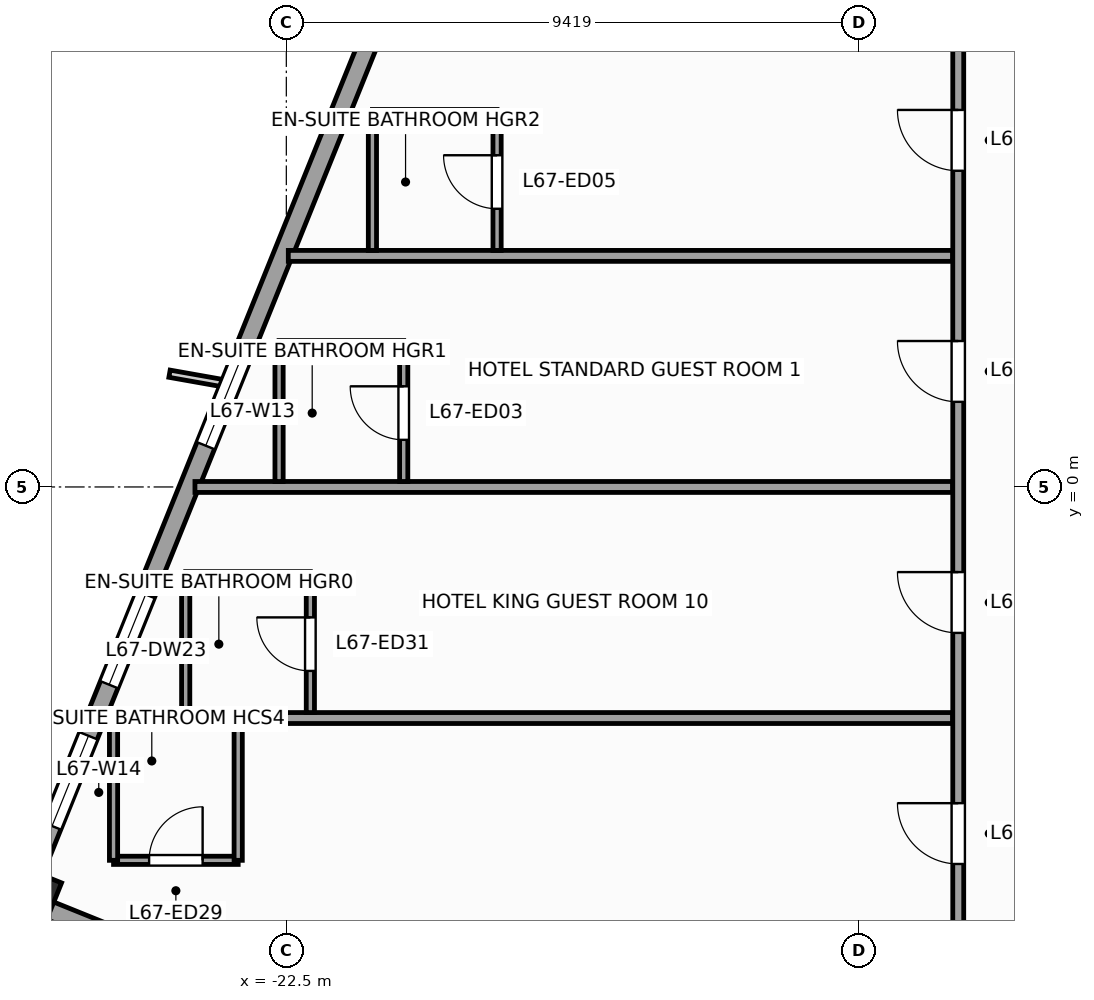
"""IFC4 building model, lengths in metres.
Left out: names, types, materials, properties, quantities, classifications, styles, units other than length and angle.
Written with IfcOpenShell. Run it as: python <this file> out.ifc"""

import sys

from ifc_helpers import new_model, si_unit, direction, frame, frame_2d, origin, origin_2d, place, context, subcontext, project, spatial, rectangle, extrude, source, transform, mapped, element, fill, save


model = new_model("IFC4")
c1 = context("Model", 3, precision=1e-05, world=origin(), true_north=direction((0.0, 1.0)))
c2 = subcontext(c1, "Body", "Model", "MODEL_VIEW")
j1 = project(units=[si_unit("LENGTHUNIT", "METRE"), si_unit("PLANEANGLEUNIT", "RADIAN")], contexts=[c1])
p1 = place(None, origin())
s1 = spatial("IfcSite", under=j1, at=p1, CompositionType="ELEMENT")
p2 = place(p1, origin())
s2 = spatial("IfcBuilding", under=s1, at=p2, CompositionType="ELEMENT")
p3 = place(p2, frame((0.0, 0.0, 276.0)))
s3 = spatial("IfcBuildingStorey", under=s2, at=p3, CompositionType="ELEMENT", Elevation=276.0)
m1 = source(origin(), c2, "Body", "SweptSolid", [
    extrude(rectangle(XDim=0.65, YDim=0.65, at=origin_2d()), origin(), (0.0, 0.0, 1.0), 3.6),
])
p4 = place(p3, frame((-26.62, -6.69, 0.0), z_axis=(0.0, 0.0, 1.0), x_axis=(0.374606593416, 0.927183854567, 0.0)))
e1 = element("IfcColumn", 1, at=p4, inside=s3, PredefinedType="COLUMN", context=c2, shape_type="MappedRepresentation", body=[
    mapped(m1, transform((0.0, 0.0, 0.0), scale=1.0)),
])
p5 = place(p3, frame((-14.479, 23.813, 0.0), z_axis=(0.0, 0.0, 1.0), x_axis=(-0.374609557019, -0.927182657188, 0.0)))
e2 = element("IfcWall", 2, at=p5, inside=s3, PredefinedType="STANDARD", context=c2, shape_type="SweptSolid", body=[
    extrude(rectangle(XDim=33.31, YDim=0.31, at=frame_2d((16.655, 0.0))), origin(), (0.0, 0.0, 1.0), 2.75),
])
p6 = place(p5, frame((3.197, 0.0, 0.47)))
e3 = element("IfcOpeningElement", 3, at=p6, cuts=e2, PredefinedType="OPENING", context=c2, shape_type="SweptSolid", body=[
    extrude(rectangle(XDim=1.6, YDim=2.1, at=frame_2d((0.8, 1.05))), frame((0.0, 0.165, 0.0), z_axis=(0.0, -1.0, 0.0), x_axis=(1.0, 0.0, 0.0)), (0.0, 0.0, 1.0), 0.33),
])
p7 = place(p5, frame((8.86, 0.0, 0.47)))
e4 = element("IfcOpeningElement", 4, at=p7, cuts=e2, PredefinedType="OPENING", context=c2, shape_type="SweptSolid", body=[
    extrude(rectangle(XDim=1.6, YDim=2.1, at=frame_2d((0.8, 1.05))), frame((0.0, 0.165, 0.0), z_axis=(0.0, -1.0, 0.0), x_axis=(1.0, 0.0, 0.0)), (0.0, 0.0, 1.0), 0.33),
])
p8 = place(p5, frame((14.439, 0.0, 0.47)))
e5 = element("IfcOpeningElement", 5, at=p8, cuts=e2, PredefinedType="OPENING", context=c2, shape_type="SweptSolid", body=[
    extrude(rectangle(XDim=1.6, YDim=2.1, at=frame_2d((0.8, 1.05))), frame((0.0, 0.165, 0.0), z_axis=(0.0, -1.0, 0.0), x_axis=(1.0, 0.0, 0.0)), (0.0, 0.0, 1.0), 0.33),
])
p9 = place(p5, frame((23.351, 0.0, 0.47)))
e6 = element("IfcOpeningElement", 6, at=p9, cuts=e2, PredefinedType="OPENING", context=c2, shape_type="SweptSolid", body=[
    extrude(rectangle(XDim=1.6, YDim=2.1, at=frame_2d((0.8, 1.05))), frame((0.0, 0.165, 0.0), z_axis=(0.0, -1.0, 0.0), x_axis=(1.0, 0.0, 0.0)), (0.0, 0.0, 1.0), 0.33),
])
p10 = place(p5, frame((30.097, 0.0, 0.47)))
e7 = element("IfcOpeningElement", 7, at=p10, cuts=e2, PredefinedType="OPENING", context=c2, shape_type="SweptSolid", body=[
    extrude(rectangle(XDim=1.6, YDim=2.1, at=frame_2d((0.8, 1.05))), frame((0.0, 0.165, 0.0), z_axis=(0.0, -1.0, 0.0), x_axis=(1.0, 0.0, 0.0)), (0.0, 0.0, 1.0), 0.33),
])
p11 = place(p5, frame((27.59, 0.0, 0.47)))
e8 = element("IfcOpeningElement", 8, at=p11, cuts=e2, PredefinedType="OPENING", context=c2, shape_type="SweptSolid", body=[
    extrude(rectangle(XDim=1.6, YDim=2.1, at=frame_2d((0.8, 1.05))), frame((0.0, 0.165, 0.0), z_axis=(0.0, -1.0, 0.0), x_axis=(1.0, 0.0, 0.0)), (0.0, 0.0, 1.0), 0.33),
])
p12 = place(p3, frame((-26.841, -6.784, 0.0), z_axis=(0.0, 0.0, 1.0), x_axis=(0.927171722085, -0.374636620962, 0.0)))
e9 = element("IfcWall", 9, at=p12, inside=s3, PredefinedType="STANDARD", context=c2, shape_type="SweptSolid", body=[
    extrude(rectangle(XDim=6.0, YDim=0.31, at=frame_2d((3.0, 0.0))), origin(), (0.0, 0.0, 1.0), 2.65),
])
p13 = place(p3, frame((-11.45, -12.35, 0.0), z_axis=(0.0, 0.0, 1.0), x_axis=(0.0, 1.0, 0.0)))
e10 = element("IfcWall", 10, at=p13, inside=s3, PredefinedType="PARTITIONING", context=c2, shape_type="SweptSolid", body=[
    extrude(rectangle(XDim=23.7, YDim=0.18, at=frame_2d((11.85, 0.0))), origin(), (0.0, 0.0, 1.0), 3.35),
])
p14 = place(p13, frame((13.75, 0.0, 0.0)))
e11 = element("IfcOpeningElement", 11, at=p14, cuts=e10, PredefinedType="OPENING", context=c2, shape_type="SweptSolid", body=[
    extrude(rectangle(XDim=1.0, YDim=2.15, at=frame_2d((0.5, 1.075))), frame((0.0, 0.1, 0.0), z_axis=(0.0, -1.0, 0.0), x_axis=(1.0, 0.0, 0.0)), (0.0, 0.0, 1.0), 0.2),
])
p15 = place(p13, frame((17.55, 0.0, 0.0)))
e12 = element("IfcOpeningElement", 12, at=p15, cuts=e10, PredefinedType="OPENING", context=c2, shape_type="SweptSolid", body=[
    extrude(rectangle(XDim=1.0, YDim=2.15, at=frame_2d((0.5, 1.075))), frame((0.0, 0.1, 0.0), z_axis=(0.0, -1.0, 0.0), x_axis=(1.0, 0.0, 0.0)), (0.0, 0.0, 1.0), 0.2),
])
p16 = place(p13, frame((6.15, 0.0, 0.0)))
e13 = element("IfcOpeningElement", 13, at=p16, cuts=e10, PredefinedType="OPENING", context=c2, shape_type="SweptSolid", body=[
    extrude(rectangle(XDim=1.0, YDim=2.15, at=frame_2d((0.5, 1.075))), frame((0.0, 0.1, 0.0), z_axis=(0.0, -1.0, 0.0), x_axis=(1.0, 0.0, 0.0)), (0.0, 0.0, 1.0), 0.2),
])
p17 = place(p13, frame((9.95, 0.0, 0.0)))
e14 = element("IfcOpeningElement", 14, at=p17, cuts=e10, PredefinedType="OPENING", context=c2, shape_type="SweptSolid", body=[
    extrude(rectangle(XDim=1.0, YDim=2.15, at=frame_2d((0.5, 1.075))), frame((0.0, 0.1, 0.0), z_axis=(0.0, -1.0, 0.0), x_axis=(1.0, 0.0, 0.0)), (0.0, 0.0, 1.0), 0.2),
])
p18 = place(p3, frame((-11.545, -3.8, 0.0), z_axis=(0.0, 0.0, 1.0), x_axis=(-1.0, 0.0, 0.0)))
e15 = element("IfcWall", 15, at=p18, inside=s3, PredefinedType="PARTITIONING", context=c2, shape_type="SweptSolid", body=[
    extrude(rectangle(XDim=13.993, YDim=0.18, at=frame_2d((6.997, 0.0))), origin(), (0.0, 0.0, 1.0), 3.35),
])
p19 = place(p3, frame((-11.545, 0.0, 0.0), z_axis=(0.0, 0.0, 1.0), x_axis=(-1.0, 0.0, 0.0)))
e16 = element("IfcWall", 16, at=p19, inside=s3, PredefinedType="PARTITIONING", context=c2, shape_type="SweptSolid", body=[
    extrude(rectangle(XDim=12.458, YDim=0.18, at=frame_2d((6.229, 0.0))), origin(), (0.0, 0.0, 1.0), 3.02),
])
p20 = place(p3, frame((-11.545, 3.8, 0.0), z_axis=(0.0, 0.0, 1.0), x_axis=(-1.0, 0.0, 0.0)))
e17 = element("IfcWall", 17, at=p20, inside=s3, PredefinedType="PARTITIONING", context=c2, shape_type="SweptSolid", body=[
    extrude(rectangle(XDim=10.923, YDim=0.18, at=frame_2d((5.461, 0.0))), origin(), (0.0, 0.0, 1.0), 3.02),
])
p21 = place(p3, frame((-20.57, 0.09, 0.0), z_axis=(0.0, 0.0, 1.0), x_axis=(0.0, 1.0, 0.0)))
e18 = element("IfcWall", 18, at=p21, inside=s3, PredefinedType="PARTITIONING", context=c2, shape_type="SweptSolid", body=[
    extrude(rectangle(XDim=2.25, YDim=0.135, at=frame_2d((1.125, 0.0))), origin(), (0.0, 0.0, 1.0), 3.35),
])
p22 = place(p21, frame((0.685, 0.0, 0.0)))
e19 = element("IfcOpeningElement", 19, at=p22, cuts=e18, PredefinedType="OPENING", context=c2, shape_type="SweptSolid", body=[
    extrude(rectangle(XDim=0.88, YDim=2.1, at=frame_2d((0.44, 1.05))), frame((0.0, 0.078, 0.0), z_axis=(0.0, -1.0, 0.0), x_axis=(1.0, 0.0, 0.0)), (0.0, 0.0, 1.0), 0.155),
])
p23 = place(p3, frame((-22.619, 2.34, 0.0), z_axis=(0.0, 0.0, 1.0), x_axis=(1.0, 0.0, 0.0)))
e20 = element("IfcWall", 20, at=p23, inside=s3, PredefinedType="PARTITIONING", context=c2, shape_type="SweptSolid", body=[
    extrude(rectangle(XDim=2.05, YDim=0.135, at=frame_2d((1.025, 0.0))), origin(), (0.0, 0.0, 1.0), 3.35),
])
p24 = place(p3, frame((-22.619, 0.09, 0.0), z_axis=(0.0, 0.0, 1.0), x_axis=(0.0, 1.0, 0.0)))
e21 = element("IfcWall", 21, at=p24, inside=s3, PredefinedType="PARTITIONING", context=c2, shape_type="SweptSolid", body=[
    extrude(rectangle(XDim=2.25, YDim=0.135, at=frame_2d((1.125, 0.0))), origin(), (0.0, 0.0, 1.0), 3.35),
])
p25 = place(p3, frame((-19.034, 3.89, 0.0), z_axis=(0.0, 0.0, 1.0), x_axis=(0.0, 1.0, 0.0)))
e22 = element("IfcWall", 22, at=p25, inside=s3, PredefinedType="PARTITIONING", context=c2, shape_type="SweptSolid", body=[
    extrude(rectangle(XDim=2.25, YDim=0.135, at=frame_2d((1.125, 0.0))), origin(), (0.0, 0.0, 1.0), 3.35),
])
p26 = place(p25, frame((0.685, 0.0, 0.0)))
e23 = element("IfcOpeningElement", 23, at=p26, cuts=e22, PredefinedType="OPENING", context=c2, shape_type="SweptSolid", body=[
    extrude(rectangle(XDim=0.88, YDim=2.1, at=frame_2d((0.44, 1.05))), frame((0.0, 0.078, 0.0), z_axis=(0.0, -1.0, 0.0), x_axis=(1.0, 0.0, 0.0)), (0.0, 0.0, 1.0), 0.155),
])
p27 = place(p3, frame((-21.084, 6.14, 0.0), z_axis=(0.0, 0.0, 1.0), x_axis=(1.0, 0.0, 0.0)))
e24 = element("IfcWall", 24, at=p27, inside=s3, PredefinedType="PARTITIONING", context=c2, shape_type="SweptSolid", body=[
    extrude(rectangle(XDim=2.05, YDim=0.135, at=frame_2d((1.025, 0.0))), origin(), (0.0, 0.0, 1.0), 3.35),
])
p28 = place(p3, frame((-21.084, 3.89, 0.0), z_axis=(0.0, 0.0, 1.0), x_axis=(0.0, 1.0, 0.0)))
e25 = element("IfcWall", 25, at=p28, inside=s3, PredefinedType="PARTITIONING", context=c2, shape_type="SweptSolid", body=[
    extrude(rectangle(XDim=2.25, YDim=0.135, at=frame_2d((1.125, 0.0))), origin(), (0.0, 0.0, 1.0), 3.35),
])
p29 = place(p3, frame((-25.342, -6.14, 0.0), z_axis=(0.0, 0.0, 1.0), x_axis=(1.0, 0.0, 0.0)))
e26 = element("IfcWall", 26, at=p29, inside=s3, PredefinedType="PARTITIONING", context=c2, shape_type="SweptSolid", body=[
    extrude(rectangle(XDim=2.05, YDim=0.135, at=frame_2d((1.025, 0.0))), origin(), (0.0, 0.0, 1.0), 3.35),
])
p30 = place(p29, frame((0.585, 0.0, 0.0)))
e27 = element("IfcOpeningElement", 27, at=p30, cuts=e26, PredefinedType="OPENING", context=c2, shape_type="SweptSolid", body=[
    extrude(rectangle(XDim=0.88, YDim=2.1, at=frame_2d((0.44, 1.05))), frame((0.0, 0.078, 0.0), z_axis=(0.0, -1.0, 0.0), x_axis=(1.0, 0.0, 0.0)), (0.0, 0.0, 1.0), 0.155),
])
p31 = place(p3, frame((-23.292, -6.14, 0.0), z_axis=(0.0, 0.0, 1.0), x_axis=(0.0, 1.0, 0.0)))
e28 = element("IfcWall", 28, at=p31, inside=s3, PredefinedType="PARTITIONING", context=c2, shape_type="SweptSolid", body=[
    extrude(rectangle(XDim=2.25, YDim=0.135, at=frame_2d((1.125, 0.0))), origin(), (0.0, 0.0, 1.0), 2.95),
])
p32 = place(p3, frame((-25.342, -6.14, 0.0), z_axis=(0.0, 0.0, 1.0), x_axis=(0.0, 1.0, 0.0)))
e29 = element("IfcWall", 29, at=p32, inside=s3, PredefinedType="PARTITIONING", context=c2, shape_type="SweptSolid", body=[
    extrude(rectangle(XDim=2.25, YDim=0.135, at=frame_2d((1.125, 0.0))), origin(), (0.0, 0.0, 1.0), 2.75),
])
p33 = place(p3, frame((-22.105, -3.71, 0.0), z_axis=(0.0, 0.0, 1.0), x_axis=(0.0, 1.0, 0.0)))
e30 = element("IfcWall", 30, at=p33, inside=s3, PredefinedType="PARTITIONING", context=c2, shape_type="SweptSolid", body=[
    extrude(rectangle(XDim=2.25, YDim=0.135, at=frame_2d((1.125, 0.0))), origin(), (0.0, 0.0, 1.0), 3.35),
])
p34 = place(p33, frame((0.685, 0.0, 0.0)))
e31 = element("IfcOpeningElement", 31, at=p34, cuts=e30, PredefinedType="OPENING", context=c2, shape_type="SweptSolid", body=[
    extrude(rectangle(XDim=0.88, YDim=2.1, at=frame_2d((0.44, 1.05))), frame((0.0, 0.078, 0.0), z_axis=(0.0, -1.0, 0.0), x_axis=(1.0, 0.0, 0.0)), (0.0, 0.0, 1.0), 0.155),
])
p35 = place(p3, frame((-24.155, -1.46, 0.0), z_axis=(0.0, 0.0, 1.0), x_axis=(1.0, 0.0, 0.0)))
e32 = element("IfcWall", 32, at=p35, inside=s3, PredefinedType="PARTITIONING", context=c2, shape_type="SweptSolid", body=[
    extrude(rectangle(XDim=2.05, YDim=0.135, at=frame_2d((1.025, 0.0))), origin(), (0.0, 0.0, 1.0), 3.35),
])
p36 = place(p3, frame((-24.155, -3.71, 0.0), z_axis=(0.0, 0.0, 1.0), x_axis=(0.0, 1.0, 0.0)))
e33 = element("IfcWall", 33, at=p36, inside=s3, PredefinedType="PARTITIONING", context=c2, shape_type="SweptSolid", body=[
    extrude(rectangle(XDim=2.25, YDim=0.135, at=frame_2d((1.125, 0.0))), origin(), (0.0, 0.0, 1.0), 3.35),
])
m2 = source(origin(), c2, "Body", "SweptSolid", [
    extrude(rectangle(XDim=1.6, YDim=2.1, at=frame_2d((0.8, 1.05))), frame((0.0, 0.03, 0.0), z_axis=(0.0, -1.0, 0.0), x_axis=(1.0, 0.0, 0.0)), (0.0, 0.0, 1.0), 0.06),
])
p37 = place(p9, origin())
e34 = element("IfcWindow", 34, at=p37, inside=s3, PartitioningType="SINGLE_PANEL", PredefinedType="WINDOW", context=c2, shape_type="MappedRepresentation", body=[
    mapped(m2, transform((0.0, 0.0, 0.0), scale=1.0)),
])
fill(e6, e34)
p38 = place(p10, origin())
e35 = element("IfcWindow", 35, at=p38, inside=s3, PartitioningType="SINGLE_PANEL", PredefinedType="WINDOW", context=c2, shape_type="MappedRepresentation", body=[
    mapped(m2, transform((0.0, 0.0, 0.0), scale=1.0)),
])
fill(e7, e35)
m3 = source(origin(), c2, "Body", "SweptSolid", [
    extrude(rectangle(XDim=1.0, YDim=2.15, at=frame_2d((0.5, 1.075))), frame((0.0, 0.025, 0.0), z_axis=(0.0, -1.0, 0.0), x_axis=(1.0, 0.0, 0.0)), (0.0, 0.0, 1.0), 0.05),
])
p39 = place(p14, origin())
e36 = element("IfcDoor", 36, at=p39, inside=s3, OperationType="SINGLE_SWING_RIGHT", PredefinedType="DOOR", context=c2, shape_type="MappedRepresentation", body=[
    mapped(m3, transform((0.0, 0.0, 0.0), scale=1.0)),
])
fill(e11, e36)
m4 = source(origin(), c2, "Body", "SweptSolid", [
    extrude(rectangle(XDim=0.88, YDim=2.1, at=frame_2d((0.44, 1.05))), frame((0.0, 0.025, 0.0), z_axis=(0.0, -1.0, 0.0), x_axis=(1.0, 0.0, 0.0)), (0.0, 0.0, 1.0), 0.05),
])
p40 = place(p22, origin())
e37 = element("IfcDoor", 37, at=p40, inside=s3, OperationType="SINGLE_SWING_RIGHT", PredefinedType="DOOR", context=c2, shape_type="MappedRepresentation", body=[
    mapped(m4, transform((0.0, 0.0, 0.0), scale=1.0)),
])
fill(e19, e37)
p41 = place(p15, origin())
e38 = element("IfcDoor", 38, at=p41, inside=s3, OperationType="SINGLE_SWING_RIGHT", PredefinedType="DOOR", context=c2, shape_type="MappedRepresentation", body=[
    mapped(m3, transform((0.0, 0.0, 0.0), scale=1.0)),
])
fill(e12, e38)
p42 = place(p26, origin())
e39 = element("IfcDoor", 39, at=p42, inside=s3, OperationType="SINGLE_SWING_RIGHT", PredefinedType="DOOR", context=c2, shape_type="MappedRepresentation", body=[
    mapped(m4, transform((0.0, 0.0, 0.0), scale=1.0)),
])
fill(e23, e39)
p43 = place(p16, origin())
e40 = element("IfcDoor", 40, at=p43, inside=s3, OperationType="SINGLE_SWING_RIGHT", PredefinedType="DOOR", context=c2, shape_type="MappedRepresentation", body=[
    mapped(m3, transform((0.0, 0.0, 0.0), scale=1.0)),
])
fill(e13, e40)
p44 = place(p30, origin())
e41 = element("IfcDoor", 41, at=p44, inside=s3, OperationType="SINGLE_SWING_RIGHT", PredefinedType="DOOR", context=c2, shape_type="MappedRepresentation", body=[
    mapped(m4, transform((0.0, 0.0, 0.0), scale=1.0)),
])
fill(e27, e41)
p45 = place(p17, origin())
e42 = element("IfcDoor", 42, at=p45, inside=s3, OperationType="SINGLE_SWING_RIGHT", PredefinedType="DOOR", context=c2, shape_type="MappedRepresentation", body=[
    mapped(m3, transform((0.0, 0.0, 0.0), scale=1.0)),
])
fill(e14, e42)
p46 = place(p34, origin())
e43 = element("IfcDoor", 43, at=p46, inside=s3, OperationType="SINGLE_SWING_RIGHT", PredefinedType="DOOR", context=c2, shape_type="MappedRepresentation", body=[
    mapped(m4, transform((0.0, 0.0, 0.0), scale=1.0)),
])
fill(e31, e43)
p47 = place(p11, origin())
e44 = element("IfcWindow", 44, at=p47, inside=s3, PartitioningType="SINGLE_PANEL", PredefinedType="WINDOW", context=c2, shape_type="MappedRepresentation", body=[
    mapped(m2, transform((0.0, 0.0, 0.0), scale=1.0)),
])
fill(e8, e44)
save(model, sys.argv[1])
